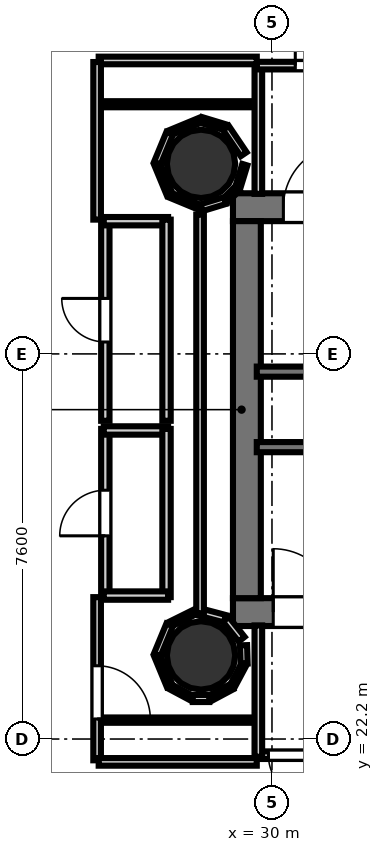
"""IFC4 building model, lengths in metres.
Left out: names, types, materials, properties, quantities, classifications, styles, units other than length and angle.
Written with IfcOpenShell. Run it as: python <this file> out.ifc"""

import sys

from ifc_helpers import new_model, si_unit, direction, frame, frame_2d, origin, origin_2d, place, context, subcontext, project, spatial, rectangle, hollow_circle, extrude, element, fill, save


model = new_model("IFC4")
c1 = context("Model", 3, precision=1e-05, world=origin(), true_north=direction((0.0, 1.0)))
c2 = subcontext(c1, "Body", "Model", "MODEL_VIEW")
j1 = project(units=[si_unit("LENGTHUNIT", "METRE"), si_unit("PLANEANGLEUNIT", "RADIAN")], contexts=[c1])
p1 = place(None, origin())
s1 = spatial("IfcSite", under=j1, at=p1, CompositionType="ELEMENT")
p2 = place(p1, origin())
s2 = spatial("IfcBuilding", under=s1, at=p2, CompositionType="ELEMENT")
p3 = place(p2, frame((0.0, 0.0, 177.2)))
s3 = spatial("IfcBuildingStorey", under=s2, at=p3, CompositionType="ELEMENT", Elevation=177.2)
p4 = place(p3, frame((29.23, 32.695, 0.0), z_axis=(0.0, 0.0, 1.0), x_axis=(1.0, 0.0, 0.0)))
e1 = element("IfcWall", 1, at=p4, inside=s3, PredefinedType="SHEAR", context=c2, shape_type="SweptSolid", body=[
    extrude(rectangle(XDim=10.62, YDim=0.55, at=frame_2d((5.31, 0.0))), origin(), (0.0, 0.0, 1.0), 3.52),
])
p5 = place(p4, frame((0.995, 0.0, 0.0)))
e2 = element("IfcOpeningElement", 2, at=p5, cuts=e1, PredefinedType="OPENING", context=c2, shape_type="SweptSolid", body=[
    extrude(rectangle(XDim=1.25, YDim=2.15, at=frame_2d((0.625, 1.075))), frame((0.0, 0.285, 0.0), z_axis=(0.0, -1.0, 0.0), x_axis=(1.0, 0.0, 0.0)), (0.0, 0.0, 1.0), 0.57),
])
p6 = place(p3, frame((29.23, 24.705, 0.0), z_axis=(0.0, 0.0, 1.0), x_axis=(1.0, 0.0, 0.0)))
e3 = element("IfcWall", 3, at=p6, inside=s3, PredefinedType="SHEAR", context=c2, shape_type="SweptSolid", body=[
    extrude(rectangle(XDim=10.62, YDim=0.55, at=frame_2d((5.31, 0.0))), origin(), (0.0, 0.0, 1.0), 3.52),
])
p7 = place(p6, frame((0.795, 0.0, 0.0)))
e4 = element("IfcOpeningElement", 4, at=p7, cuts=e3, PredefinedType="OPENING", context=c2, shape_type="SweptSolid", body=[
    extrude(rectangle(XDim=1.25, YDim=2.15, at=frame_2d((0.625, 1.075))), frame((0.0, 0.285, 0.0), z_axis=(0.0, -1.0, 0.0), x_axis=(1.0, 0.0, 0.0)), (0.0, 0.0, 1.0), 0.57),
])
p8 = place(p3, frame((29.505, 24.98, 0.0), z_axis=(0.0, 0.0, 1.0), x_axis=(0.0, 1.0, 0.0)))
e5 = element("IfcWall", 5, at=p8, inside=s3, PredefinedType="SHEAR", context=c2, shape_type="SweptSolid", body=[
    extrude(rectangle(XDim=7.44, YDim=0.55, at=frame_2d((3.72, 0.0))), origin(), (0.0, 0.0, 1.0), 3.52),
])
for number, where, z_axis, x_axis in (
    (6, (28.6, 33.55, 0.0), (0.0, 0.0, 1.0), (1.0, 0.0, 0.0)),
    (7, (28.6, 23.85, 0.0), (0.0, 0.0, 1.0), (1.0, 0.0, 0.0)),
):
    element("IfcColumn", number, at=place(p3, frame(where, z_axis=z_axis, x_axis=x_axis)), inside=s3, PredefinedType="COLUMN", context=c2, shape_type="SweptSolid", body=[
        extrude(hollow_circle(Radius=0.675, WallThickness=0.032, at=origin_2d()), origin(), (0.0, 0.0, 1.0), 3.7),
    ])
p9 = place(p3, frame((29.7, 29.45, 0.0), z_axis=(0.0, 0.0, 1.0), x_axis=(1.0, 0.0, 0.0)))
e8 = element("IfcWall", 8, at=p9, inside=s3, PredefinedType="SOLIDWALL", context=c2, shape_type="SweptSolid", body=[
    extrude(rectangle(XDim=8.3, YDim=0.2, at=frame_2d((4.15, 0.0))), origin(), (0.0, 0.0, 1.0), 3.52),
])
p10 = place(p3, frame((29.7, 27.96, 0.0), z_axis=(0.0, 0.0, 1.0), x_axis=(1.0, 0.0, 0.0)))
e9 = element("IfcWall", 9, at=p10, inside=s3, PredefinedType="SOLIDWALL", context=c2, shape_type="SweptSolid", body=[
    extrude(rectangle(XDim=7.75, YDim=0.2, at=frame_2d((3.875, 0.0))), origin(), (0.0, 0.0, 1.0), 3.52),
])
p11 = place(p3, frame((29.731, 32.958, 0.0), z_axis=(0.0, 0.0, 1.0), x_axis=(0.0, 1.0, 0.0)))
e10 = element("IfcWall", 10, at=p11, inside=s3, PredefinedType="PARTITIONING", context=c2, shape_type="SweptSolid", body=[
    extrude(rectangle(XDim=2.562, YDim=0.15, at=frame_2d((1.281, 0.0))), origin(), (0.0, 0.0, 1.0), 2.84),
])
p12 = place(p3, frame((29.7, 35.489, 0.0), z_axis=(0.0, 0.0, 1.0), x_axis=(1.0, 0.0, 0.0)))
e11 = element("IfcWall", 11, at=p12, inside=s3, PredefinedType="PARTITIONING", context=c2, shape_type="SweptSolid", body=[
    extrude(rectangle(XDim=2.72, YDim=0.15, at=frame_2d((1.36, 0.0))), origin(), (0.0, 0.0, 1.0), 2.84),
])
p13 = place(p12, frame((0.76, 0.0, 0.0)))
e12 = element("IfcOpeningElement", 12, at=p13, cuts=e11, PredefinedType="OPENING", context=c2, shape_type="SweptSolid", body=[
    extrude(rectangle(XDim=1.2, YDim=2.15, at=frame_2d((0.6, 1.075))), frame((0.0, 0.085, 0.0), z_axis=(0.0, -1.0, 0.0), x_axis=(1.0, 0.0, 0.0)), (0.0, 0.0, 1.0), 0.17),
])
p14 = place(p3, frame((33.45, 21.881, 0.0), z_axis=(0.0, 0.0, 1.0), x_axis=(-1.0, 0.0, 0.0)))
e13 = element("IfcWall", 13, at=p14, inside=s3, PredefinedType="PARTITIONING", context=c2, shape_type="SweptSolid", body=[
    extrude(rectangle(XDim=3.75, YDim=0.15, at=frame_2d((1.875, 0.0))), origin(), (0.0, 0.0, 1.0), 2.84),
])
p15 = place(p14, frame((1.275, 0.0, 0.0)))
e14 = element("IfcOpeningElement", 14, at=p15, cuts=e13, PredefinedType="OPENING", context=c2, shape_type="SweptSolid", body=[
    extrude(rectangle(XDim=1.2, YDim=2.15, at=frame_2d((0.6, 1.075))), frame((0.0, 0.085, 0.0), z_axis=(0.0, -1.0, 0.0), x_axis=(1.0, 0.0, 0.0)), (0.0, 0.0, 1.0), 0.17),
])
p16 = place(p14, frame((2.66, 0.0, 0.0)))
e15 = element("IfcOpeningElement", 15, at=p16, cuts=e13, PredefinedType="OPENING", context=c2, shape_type="SweptSolid", body=[
    extrude(rectangle(XDim=0.86, YDim=2.05, at=frame_2d((0.43, 1.025))), frame((0.0, 0.085, 0.0), z_axis=(0.0, -1.0, 0.0), x_axis=(1.0, 0.0, 0.0)), (0.0, 0.0, 1.0), 0.17),
])
p17 = place(p3, frame((29.731, 21.85, 0.0), z_axis=(0.0, 0.0, 1.0), x_axis=(0.0, 1.0, 0.0)))
e16 = element("IfcWall", 16, at=p17, inside=s3, PredefinedType="PARTITIONING", context=c2, shape_type="SweptSolid", body=[
    extrude(rectangle(XDim=2.592, YDim=0.15, at=frame_2d((1.296, 0.0))), origin(), (0.0, 0.0, 1.0), 2.84),
])
p18 = place(p3, frame((26.711, 25.0, 0.0), z_axis=(0.0, 0.0, 1.0), x_axis=(0.0, 1.0, 0.0)))
e17 = element("IfcWall", 17, at=p18, inside=s3, PredefinedType="PLUMBINGWALL", context=c2, shape_type="SweptSolid", body=[
    extrude(rectangle(XDim=3.32, YDim=0.165, at=frame_2d((1.66, 0.0))), origin(), (0.0, 0.0, 1.0), 2.84),
])
p19 = place(p18, frame((1.21, 0.0, 0.0)))
e18 = element("IfcOpeningElement", 18, at=p19, cuts=e17, PredefinedType="OPENING", context=c2, shape_type="SweptSolid", body=[
    extrude(rectangle(XDim=0.9, YDim=2.1, at=frame_2d((0.45, 1.05))), frame((0.0, 0.093, 0.0), z_axis=(0.0, -1.0, 0.0), x_axis=(1.0, 0.0, 0.0)), (0.0, 0.0, 1.0), 0.185),
])
p20 = place(p3, frame((26.68, 28.289, 0.0), z_axis=(0.0, 0.0, 1.0), x_axis=(1.0, 0.0, 0.0)))
e19 = element("IfcWall", 19, at=p20, inside=s3, PredefinedType="PLUMBINGWALL", context=c2, shape_type="SweptSolid", body=[
    extrude(rectangle(XDim=1.27, YDim=0.165, at=frame_2d((0.635, 0.0))), origin(), (0.0, 0.0, 1.0), 2.84),
])
p21 = place(p3, frame((27.919, 28.32, 0.0), z_axis=(0.0, 0.0, 1.0), x_axis=(0.0, -1.0, 0.0)))
e20 = element("IfcWall", 20, at=p21, inside=s3, PredefinedType="PLUMBINGWALL", context=c2, shape_type="SweptSolid", body=[
    extrude(rectangle(XDim=3.32, YDim=0.165, at=frame_2d((1.66, 0.0))), origin(), (0.0, 0.0, 1.0), 2.84),
])
p22 = place(p3, frame((27.95, 25.031, 0.0), z_axis=(0.0, 0.0, 1.0), x_axis=(-1.0, 0.0, 0.0)))
e21 = element("IfcWall", 21, at=p22, inside=s3, PredefinedType="PLUMBINGWALL", context=c2, shape_type="SweptSolid", body=[
    extrude(rectangle(XDim=1.27, YDim=0.165, at=frame_2d((0.635, 0.0))), origin(), (0.0, 0.0, 1.0), 2.84),
])
p23 = place(p3, frame((26.711, 28.48, 0.0), z_axis=(0.0, 0.0, 1.0), x_axis=(0.0, 1.0, 0.0)))
e22 = element("IfcWall", 22, at=p23, inside=s3, PredefinedType="PLUMBINGWALL", context=c2, shape_type="SweptSolid", body=[
    extrude(rectangle(XDim=3.97, YDim=0.165, at=frame_2d((1.985, 0.0))), origin(), (0.0, 0.0, 1.0), 2.84),
])
p24 = place(p23, frame((1.555, 0.0, 0.0)))
e23 = element("IfcOpeningElement", 23, at=p24, cuts=e22, PredefinedType="OPENING", context=c2, shape_type="SweptSolid", body=[
    extrude(rectangle(XDim=0.86, YDim=2.05, at=frame_2d((0.43, 1.025))), frame((0.0, 0.093, 0.0), z_axis=(0.0, -1.0, 0.0), x_axis=(1.0, 0.0, 0.0)), (0.0, 0.0, 1.0), 0.185),
])
p25 = place(p3, frame((26.68, 32.419, 0.0), z_axis=(0.0, 0.0, 1.0), x_axis=(1.0, 0.0, 0.0)))
e24 = element("IfcWall", 24, at=p25, inside=s3, PredefinedType="PLUMBINGWALL", context=c2, shape_type="SweptSolid", body=[
    extrude(rectangle(XDim=1.27, YDim=0.165, at=frame_2d((0.635, 0.0))), origin(), (0.0, 0.0, 1.0), 2.84),
])
p26 = place(p3, frame((27.919, 32.45, 0.0), z_axis=(0.0, 0.0, 1.0), x_axis=(0.0, -1.0, 0.0)))
e25 = element("IfcWall", 25, at=p26, inside=s3, PredefinedType="PLUMBINGWALL", context=c2, shape_type="SweptSolid", body=[
    extrude(rectangle(XDim=3.97, YDim=0.165, at=frame_2d((1.985, 0.0))), origin(), (0.0, 0.0, 1.0), 2.84),
])
p27 = place(p3, frame((29.402, 24.169, 0.0), z_axis=(0.0, 0.0, 1.0), x_axis=(-0.622091855036, 0.782944266151, 0.0)))
e26 = element("IfcWall", 26, at=p27, inside=s3, PredefinedType="PARTITIONING", context=c2, shape_type="SweptSolid", body=[
    extrude(rectangle(XDim=0.504, YDim=0.15, at=frame_2d((0.252, 0.0))), origin(), (0.0, 0.0, 1.0), 2.84),
])
p28 = place(p3, frame((29.072, 24.574, 0.0), z_axis=(0.0, 0.0, 1.0), x_axis=(-0.966842101769, 0.255374920942, 0.0)))
e27 = element("IfcWall", 27, at=p28, inside=s3, PredefinedType="PARTITIONING", context=c2, shape_type="SweptSolid", body=[
    extrude(rectangle(XDim=0.531, YDim=0.15, at=frame_2d((0.266, 0.0))), origin(), (0.0, 0.0, 1.0), 2.84),
])
p29 = place(p3, frame((28.581, 24.68, 0.0), z_axis=(0.0, 0.0, 1.0), x_axis=(0.0, 1.0, 0.0)))
e28 = element("IfcWall", 28, at=p29, inside=s3, PredefinedType="PARTITIONING", context=c2, shape_type="SweptSolid", body=[
    extrude(rectangle(XDim=7.87, YDim=0.15, at=frame_2d((3.935, 0.0))), origin(), (0.0, 0.0, 1.0), 2.84),
])
p30 = place(p3, frame((29.7, 35.591, 0.0), z_axis=(0.0, 0.0, 1.0), x_axis=(-1.0, 0.0, 0.0)))
e29 = element("IfcWall", 29, at=p30, inside=s3, PredefinedType="PARTITIONING", context=c2, shape_type="SweptSolid", body=[
    extrude(rectangle(XDim=3.12, YDim=0.15, at=frame_2d((1.56, 0.0))), origin(), (0.0, 0.0, 1.0), 2.84),
])
p31 = place(p3, frame((26.549, 35.56, 0.0), z_axis=(0.0, 0.0, 1.0), x_axis=(0.0, -1.0, 0.0)))
e30 = element("IfcWall", 30, at=p31, inside=s3, PredefinedType="PARTITIONING", context=c2, shape_type="SweptSolid", body=[
    extrude(rectangle(XDim=3.11, YDim=0.15, at=frame_2d((1.555, 0.0))), origin(), (0.0, 0.0, 1.0), 2.84),
])
p32 = place(p3, frame((26.549, 25.0, 0.0), z_axis=(0.0, 0.0, 1.0), x_axis=(0.0, -1.0, 0.0)))
e31 = element("IfcWall", 31, at=p32, inside=s3, PredefinedType="PARTITIONING", context=c2, shape_type="SweptSolid", body=[
    extrude(rectangle(XDim=3.22, YDim=0.15, at=frame_2d((1.61, 0.0))), origin(), (0.0, 0.0, 1.0), 2.84),
])
p33 = place(p32, frame((1.354, 0.0, 0.0)))
e32 = element("IfcOpeningElement", 32, at=p33, cuts=e31, PredefinedType="OPENING", context=c2, shape_type="SweptSolid", body=[
    extrude(rectangle(XDim=1.05, YDim=2.15, at=frame_2d((0.525, 1.075))), frame((0.0, 0.085, 0.0), z_axis=(0.0, -1.0, 0.0), x_axis=(1.0, 0.0, 0.0)), (0.0, 0.0, 1.0), 0.17),
])
p34 = place(p3, frame((26.58, 21.749, 0.0), z_axis=(0.0, 0.0, 1.0), x_axis=(1.0, 0.0, 0.0)))
e33 = element("IfcWall", 33, at=p34, inside=s3, PredefinedType="PARTITIONING", context=c2, shape_type="SweptSolid", body=[
    extrude(rectangle(XDim=3.12, YDim=0.15, at=frame_2d((1.56, 0.0))), origin(), (0.0, 0.0, 1.0), 2.84),
])
p35 = place(p3, frame((26.66, 34.727, 0.0), z_axis=(0.0, 0.0, 1.0), x_axis=(1.0, 0.0, 0.0)))
e34 = element("IfcWall", 34, at=p35, inside=s3, PredefinedType="PARTITIONING", context=c2, shape_type="SweptSolid", body=[
    extrude(rectangle(XDim=2.96, YDim=0.12, at=frame_2d((1.48, 0.0))), origin(), (0.0, 0.0, 1.0), 2.84),
])
p36 = place(p3, frame((29.441, 33.741, 0.0), z_axis=(0.0, 0.0, 1.0), x_axis=(-0.559619584068, 0.828749613048, 0.0)))
e35 = element("IfcWall", 35, at=p36, inside=s3, PredefinedType="PARTITIONING", context=c2, shape_type="SweptSolid", body=[
    extrude(rectangle(XDim=0.629, YDim=0.14, at=frame_2d((0.314, 0.0))), origin(), (0.0, 0.0, 1.0), 2.84),
])
p37 = place(p3, frame((29.073, 34.274, 0.0), z_axis=(0.0, 0.0, 1.0), x_axis=(-0.956893067978, 0.290440452511, 0.0)))
e36 = element("IfcWall", 36, at=p37, inside=s3, PredefinedType="PARTITIONING", context=c2, shape_type="SweptSolid", body=[
    extrude(rectangle(XDim=0.485, YDim=0.12, at=frame_2d((0.243, 0.0))), origin(), (0.0, 0.0, 1.0), 2.84),
])
p38 = place(p3, frame((28.588, 34.414, 0.0), z_axis=(0.0, 0.0, 1.0), x_axis=(-0.923956302996, -0.382498039412, 0.0)))
e37 = element("IfcWall", 37, at=p38, inside=s3, PredefinedType="PARTITIONING", context=c2, shape_type="SweptSolid", body=[
    extrude(rectangle(XDim=0.639, YDim=0.105, at=frame_2d((0.319, 0.0))), origin(), (0.0, 0.0, 1.0), 2.84),
])
p39 = place(p3, frame((27.981, 34.152, 0.0), z_axis=(0.0, 0.0, 1.0), x_axis=(-0.382824178437, -0.923821221018, 0.0)))
e38 = element("IfcWall", 38, at=p39, inside=s3, PredefinedType="PARTITIONING", context=c2, shape_type="SweptSolid", body=[
    extrude(rectangle(XDim=0.639, YDim=0.14, at=frame_2d((0.319, 0.0))), origin(), (0.0, 0.0, 1.0), 2.84),
])
p40 = place(p3, frame((27.736, 33.538, 0.0), z_axis=(0.0, 0.0, 1.0), x_axis=(0.382824178437, -0.923821221018, 0.0)))
e39 = element("IfcWall", 39, at=p40, inside=s3, PredefinedType="PARTITIONING", context=c2, shape_type="SweptSolid", body=[
    extrude(rectangle(XDim=0.639, YDim=0.12, at=frame_2d((0.319, 0.0))), origin(), (0.0, 0.0, 1.0), 2.84),
])
p41 = place(p3, frame((27.998, 32.931, 0.0), z_axis=(0.0, 0.0, 1.0), x_axis=(0.923821221018, -0.382824178437, 0.0)))
e40 = element("IfcWall", 40, at=p41, inside=s3, PredefinedType="PARTITIONING", context=c2, shape_type="SweptSolid", body=[
    extrude(rectangle(XDim=0.639, YDim=0.105, at=frame_2d((0.319, 0.0))), origin(), (0.0, 0.0, 1.0), 2.84),
])
p42 = place(p3, frame((28.609, 32.685, 0.0), z_axis=(0.0, 0.0, 1.0), x_axis=(0.956893067978, 0.290440452511, 0.0)))
e41 = element("IfcWall", 41, at=p42, inside=s3, PredefinedType="PARTITIONING", context=c2, shape_type="SweptSolid", body=[
    extrude(rectangle(XDim=0.485, YDim=0.14, at=frame_2d((0.243, 0.0))), origin(), (0.0, 0.0, 1.0), 2.84),
])
p43 = place(p3, frame((29.086, 32.834, 0.0), z_axis=(0.0, 0.0, 1.0), x_axis=(0.707106781187, 0.707106781187, 0.0)))
e42 = element("IfcWall", 42, at=p43, inside=s3, PredefinedType="PARTITIONING", context=c2, shape_type="SweptSolid", body=[
    extrude(rectangle(XDim=0.326, YDim=0.12, at=frame_2d((0.163, 0.0))), origin(), (0.0, 0.0, 1.0), 2.84),
])
p44 = place(p3, frame((29.324, 33.077, 0.0), z_axis=(0.0, 0.0, 1.0), x_axis=(0.292866596221, 0.956153312402, 0.0)))
e43 = element("IfcWall", 43, at=p44, inside=s3, PredefinedType="PARTITIONING", context=c2, shape_type="SweptSolid", body=[
    extrude(rectangle(XDim=0.479, YDim=0.105, at=frame_2d((0.239, 0.0))), origin(), (0.0, 0.0, 1.0), 2.84),
])
p45 = place(p3, frame((28.466, 24.701, 0.0), z_axis=(0.0, 0.0, 1.0), x_axis=(-0.896097594631, -0.4438570726, 0.0)))
e44 = element("IfcWall", 44, at=p45, inside=s3, PredefinedType="PARTITIONING", context=c2, shape_type="SweptSolid", body=[
    extrude(rectangle(XDim=0.524, YDim=0.105, at=frame_2d((0.262, 0.0))), origin(), (0.0, 0.0, 1.0), 2.84),
])
p46 = place(p3, frame((27.981, 24.452, 0.0), z_axis=(0.0, 0.0, 1.0), x_axis=(-0.38268910224, -0.923877183952, 0.0)))
e45 = element("IfcWall", 45, at=p46, inside=s3, PredefinedType="PARTITIONING", context=c2, shape_type="SweptSolid", body=[
    extrude(rectangle(XDim=0.639, YDim=0.14, at=frame_2d((0.32, 0.0))), origin(), (0.0, 0.0, 1.0), 2.84),
])
p47 = place(p3, frame((27.736, 23.838, 0.0), z_axis=(0.0, 0.0, 1.0), x_axis=(0.382824178437, -0.923821221018, 0.0)))
e46 = element("IfcWall", 46, at=p47, inside=s3, PredefinedType="PARTITIONING", context=c2, shape_type="SweptSolid", body=[
    extrude(rectangle(XDim=0.639, YDim=0.12, at=frame_2d((0.319, 0.0))), origin(), (0.0, 0.0, 1.0), 2.84),
])
p48 = place(p3, frame((27.995, 23.232, 0.0), z_axis=(0.0, 0.0, 1.0), x_axis=(0.88190639713, -0.471424550379, 0.0)))
e47 = element("IfcWall", 47, at=p48, inside=s3, PredefinedType="PARTITIONING", context=c2, shape_type="SweptSolid", body=[
    extrude(rectangle(XDim=0.485, YDim=0.105, at=frame_2d((0.242, 0.0))), origin(), (0.0, 0.0, 1.0), 2.84),
])
p49 = place(p3, frame((28.437, 23.0, 0.0), z_axis=(0.0, 0.0, 1.0), x_axis=(1.0, 0.0, 0.0)))
e48 = element("IfcWall", 48, at=p49, inside=s3, PredefinedType="PARTITIONING", context=c2, shape_type="SweptSolid", body=[
    extrude(rectangle(XDim=0.326, YDim=0.14, at=frame_2d((0.163, 0.0))), origin(), (0.0, 0.0, 1.0), 2.84),
])
p50 = place(p3, frame((28.778, 23.004, 0.0), z_axis=(0.0, 0.0, 1.0), x_axis=(0.88190639713, 0.471424550379, 0.0)))
e49 = element("IfcWall", 49, at=p50, inside=s3, PredefinedType="PARTITIONING", context=c2, shape_type="SweptSolid", body=[
    extrude(rectangle(XDim=0.485, YDim=0.12, at=frame_2d((0.242, 0.0))), origin(), (0.0, 0.0, 1.0), 2.84),
])
p51 = place(p3, frame((29.218, 23.245, 0.0), z_axis=(0.0, 0.0, 1.0), x_axis=(0.471424550379, 0.88190639713, 0.0)))
e50 = element("IfcWall", 50, at=p51, inside=s3, PredefinedType="PARTITIONING", context=c2, shape_type="SweptSolid", body=[
    extrude(rectangle(XDim=0.485, YDim=0.105, at=frame_2d((0.242, 0.0))), origin(), (0.0, 0.0, 1.0), 2.84),
])
p52 = place(p3, frame((29.45, 23.688, 0.0), z_axis=(0.0, 0.0, 1.0), x_axis=(-0.030919976938, 0.999521863206, 0.0)))
e51 = element("IfcWall", 51, at=p52, inside=s3, PredefinedType="PARTITIONING", context=c2, shape_type="SweptSolid", body=[
    extrude(rectangle(XDim=0.363, YDim=0.14, at=frame_2d((0.182, 0.0))), origin(), (0.0, 0.0, 1.0), 2.84),
])
p53 = place(p3, frame((29.62, 22.573, 0.0), z_axis=(0.0, 0.0, 1.0), x_axis=(-1.0, 0.0, 0.0)))
e52 = element("IfcWall", 52, at=p53, inside=s3, PredefinedType="PARTITIONING", context=c2, shape_type="SweptSolid", body=[
    extrude(rectangle(XDim=2.96, YDim=0.105, at=frame_2d((1.48, 0.0))), origin(), (0.0, 0.0, 1.0), 2.84),
])
p54 = place(p5, origin())
e53 = element("IfcDoor", 53, at=p54, inside=s3, OperationType="SINGLE_SWING_RIGHT", PredefinedType="DOOR", context=c2, shape_type="SweptSolid", body=[
    extrude(rectangle(XDim=1.25, YDim=2.15, at=frame_2d((0.625, 1.075))), frame((0.0, 0.025, 0.0), z_axis=(0.0, -1.0, 0.0), x_axis=(1.0, 0.0, 0.0)), (0.0, 0.0, 1.0), 0.05),
])
fill(e2, e53)
p55 = place(p7, origin())
e54 = element("IfcDoor", 54, at=p55, inside=s3, OperationType="SINGLE_SWING_LEFT", PredefinedType="DOOR", context=c2, shape_type="SweptSolid", body=[
    extrude(rectangle(XDim=1.25, YDim=2.15, at=frame_2d((0.625, 1.075))), frame((0.0, 0.025, 0.0), z_axis=(0.0, -1.0, 0.0), x_axis=(1.0, 0.0, 0.0)), (0.0, 0.0, 1.0), 0.05),
])
fill(e4, e54)
p56 = place(p13, origin())
e55 = element("IfcDoor", 55, at=p56, inside=s3, OperationType="SINGLE_SWING_LEFT", PredefinedType="DOOR", context=c2, shape_type="SweptSolid", body=[
    extrude(rectangle(XDim=1.2, YDim=2.15, at=frame_2d((0.6, 1.075))), frame((0.0, 0.025, 0.0), z_axis=(0.0, -1.0, 0.0), x_axis=(1.0, 0.0, 0.0)), (0.0, 0.0, 1.0), 0.05),
])
fill(e12, e55)
p57 = place(p19, origin())
e56 = element("IfcDoor", 56, at=p57, inside=s3, OperationType="SINGLE_SWING_LEFT", PredefinedType="DOOR", context=c2, shape_type="SweptSolid", body=[
    extrude(rectangle(XDim=0.9, YDim=2.1, at=frame_2d((0.45, 1.05))), frame((0.0, 0.025, 0.0), z_axis=(0.0, -1.0, 0.0), x_axis=(1.0, 0.0, 0.0)), (0.0, 0.0, 1.0), 0.05),
])
fill(e18, e56)
p58 = place(p24, origin())
e57 = element("IfcDoor", 57, at=p58, inside=s3, OperationType="SINGLE_SWING_RIGHT", PredefinedType="DOOR", context=c2, shape_type="SweptSolid", body=[
    extrude(rectangle(XDim=0.86, YDim=2.05, at=frame_2d((0.43, 1.025))), frame((0.0, 0.025, 0.0), z_axis=(0.0, -1.0, 0.0), x_axis=(1.0, 0.0, 0.0)), (0.0, 0.0, 1.0), 0.05),
])
fill(e23, e57)
p59 = place(p16, origin())
e58 = element("IfcDoor", 58, at=p59, inside=s3, OperationType="SINGLE_SWING_LEFT", PredefinedType="DOOR", context=c2, shape_type="SweptSolid", body=[
    extrude(rectangle(XDim=0.86, YDim=2.05, at=frame_2d((0.43, 1.025))), frame((0.0, 0.025, 0.0), z_axis=(0.0, -1.0, 0.0), x_axis=(1.0, 0.0, 0.0)), (0.0, 0.0, 1.0), 0.05),
])
fill(e15, e58)
p60 = place(p33, origin())
e59 = element("IfcDoor", 59, at=p60, inside=s3, OperationType="SINGLE_SWING_RIGHT", PredefinedType="DOOR", context=c2, shape_type="SweptSolid", body=[
    extrude(rectangle(XDim=1.05, YDim=2.15, at=frame_2d((0.525, 1.075))), frame((0.0, 0.025, 0.0), z_axis=(0.0, -1.0, 0.0), x_axis=(1.0, 0.0, 0.0)), (0.0, 0.0, 1.0), 0.05),
])
fill(e32, e59)
save(model, sys.argv[1])
